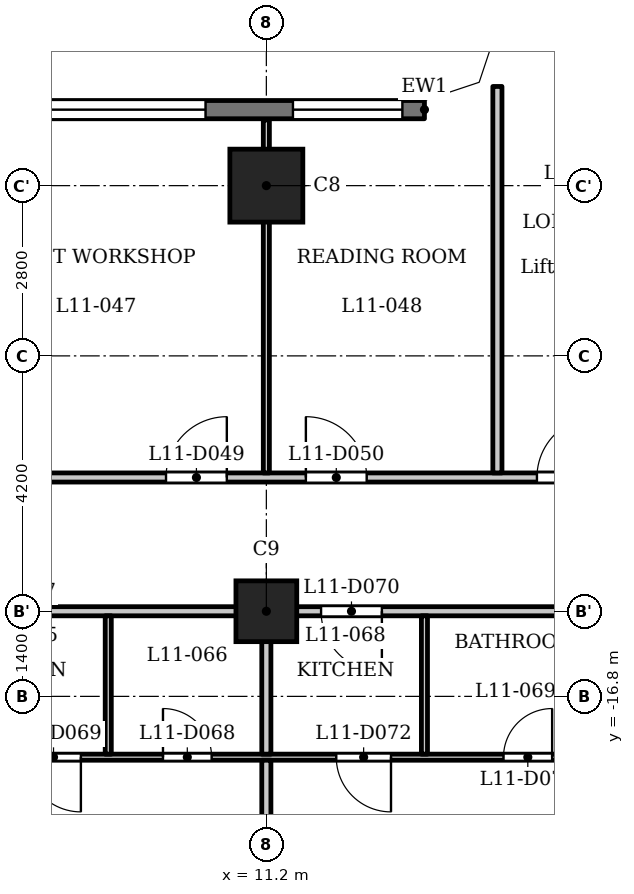
"""IFC4 building model, lengths in metres.
Left out: names, types, materials, properties, quantities, classifications, styles, units other than length and angle.
Written with IfcOpenShell. Run it as: python <this file> out.ifc"""

import sys

from ifc_helpers import new_model, si_unit, direction, frame, frame_2d, origin, origin_2d, place, context, subcontext, project, spatial, polyline, rectangle, outline, extrude, element, fill, save


model = new_model("IFC4")
c1 = context("Model", 3, precision=1e-05, world=origin(), true_north=direction((0.0, 1.0)))
c2 = subcontext(c1, "Body", "Model", "MODEL_VIEW")
j1 = project(units=[si_unit("LENGTHUNIT", "METRE"), si_unit("PLANEANGLEUNIT", "RADIAN")], contexts=[c1])
p1 = place(None, origin())
s1 = spatial("IfcSite", under=j1, at=p1, CompositionType="ELEMENT")
p2 = place(p1, origin())
s2 = spatial("IfcBuilding", under=s1, at=p2, CompositionType="ELEMENT")
p3 = place(p2, frame((0.0, 0.0, 48.0)))
s3 = spatial("IfcBuildingStorey", under=s2, at=p3, CompositionType="ELEMENT", Elevation=48.0)
p4 = place(p3, frame((11.2, -8.4, 0.0), z_axis=(0.0, 0.0, 1.0), x_axis=(1.0, 0.0, 0.0)))
e1 = element("IfcColumn", 1, at=p4, inside=s3, PredefinedType="COLUMN", context=c2, shape_type="SweptSolid", body=[
    extrude(rectangle(XDim=1.2, YDim=1.2, at=origin_2d()), origin(), (0.0, 0.0, 1.0), 3.5),
])
p5 = place(p3, frame((11.2, -15.4, 0.0), z_axis=(0.0, 0.0, 1.0), x_axis=(1.0, 0.0, 0.0)))
e2 = element("IfcColumn", 2, at=p5, inside=s3, PredefinedType="COLUMN", context=c2, shape_type="SweptSolid", body=[
    extrude(rectangle(XDim=1.0, YDim=1.0, at=origin_2d()), origin(), (0.0, 0.0, 1.0), 3.5),
])
p6 = place(p3, frame((13.8, -7.15, 0.0), z_axis=(0.0, 0.0, 1.0), x_axis=(-1.0, 0.0, 0.0)))
e3 = element("IfcWall", 3, at=p6, inside=s3, PredefinedType="SOLIDWALL", context=c2, shape_type="SweptSolid", body=[
    extrude(rectangle(XDim=27.6, YDim=0.3, at=frame_2d((13.8, 0.0))), origin(), (0.0, 0.0, 1.0), 3.2),
])
p7 = place(p6, frame((0.363, 0.0, 0.9)))
e4 = element("IfcOpeningElement", 4, at=p7, cuts=e3, PredefinedType="OPENING", context=c2, shape_type="SweptSolid", body=[
    extrude(rectangle(XDim=1.8, YDim=1.25, at=frame_2d((0.9, 0.625))), frame((0.0, 0.16, 0.0), z_axis=(0.0, -1.0, 0.0), x_axis=(1.0, 0.0, 0.0)), (0.0, 0.0, 1.0), 0.32),
])
p8 = place(p6, frame((3.6, 0.0, 1.2)))
e5 = element("IfcOpeningElement", 5, at=p8, cuts=e3, PredefinedType="OPENING", context=c2, shape_type="SweptSolid", body=[
    extrude(rectangle(XDim=3.6, YDim=0.95, at=frame_2d((1.8, 0.475))), frame((0.0, 0.16, 0.0), z_axis=(0.0, -1.0, 0.0), x_axis=(1.0, 0.0, 0.0)), (0.0, 0.0, 1.0), 0.32),
])
p9 = place(p6, frame((9.2, 0.0, 1.2)))
e6 = element("IfcOpeningElement", 6, at=p9, cuts=e3, PredefinedType="OPENING", context=c2, shape_type="SweptSolid", body=[
    extrude(rectangle(XDim=3.6, YDim=0.95, at=frame_2d((1.8, 0.475))), frame((0.0, 0.16, 0.0), z_axis=(0.0, -1.0, 0.0), x_axis=(1.0, 0.0, 0.0)), (0.0, 0.0, 1.0), 0.32),
])
p10 = place(p6, frame((14.8, 0.0, 1.2)))
e7 = element("IfcOpeningElement", 7, at=p10, cuts=e3, PredefinedType="OPENING", context=c2, shape_type="SweptSolid", body=[
    extrude(rectangle(XDim=3.6, YDim=0.95, at=frame_2d((1.8, 0.475))), frame((0.0, 0.16, 0.0), z_axis=(0.0, -1.0, 0.0), x_axis=(1.0, 0.0, 0.0)), (0.0, 0.0, 1.0), 0.32),
])
p11 = place(p6, frame((20.4, 0.0, 1.2)))
e8 = element("IfcOpeningElement", 8, at=p11, cuts=e3, PredefinedType="OPENING", context=c2, shape_type="SweptSolid", body=[
    extrude(rectangle(XDim=3.6, YDim=0.95, at=frame_2d((1.8, 0.475))), frame((0.0, 0.16, 0.0), z_axis=(0.0, -1.0, 0.0), x_axis=(1.0, 0.0, 0.0)), (0.0, 0.0, 1.0), 0.32),
])
p12 = place(p6, frame((25.438, 0.0, 0.9)))
e9 = element("IfcOpeningElement", 9, at=p12, cuts=e3, PredefinedType="OPENING", context=c2, shape_type="SweptSolid", body=[
    extrude(rectangle(XDim=1.8, YDim=1.25, at=frame_2d((0.9, 0.625))), frame((0.0, 0.16, 0.0), z_axis=(0.0, -1.0, 0.0), x_axis=(1.0, 0.0, 0.0)), (0.0, 0.0, 1.0), 0.32),
])
p13 = place(p3, frame((-26.394, -17.8, 0.0), z_axis=(0.0, 0.0, 1.0), x_axis=(1.0, 0.0, 0.0)))
e10 = element("IfcWall", 10, at=p13, inside=s3, PredefinedType="PARTITIONING", context=c2, shape_type="SweptSolid", body=[
    extrude(rectangle(XDim=53.126, YDim=0.1, at=frame_2d((26.563, 0.0))), origin(), (0.0, 0.0, 1.0), 3.2),
])
p14 = place(p13, frame((0.794, 0.0, 0.0)))
e11 = element("IfcOpeningElement", 11, at=p14, cuts=e10, PredefinedType="OPENING", context=c2, shape_type="SweptSolid", body=[
    extrude(rectangle(XDim=0.8, YDim=2.1, at=frame_2d((0.4, 1.05))), frame((0.0, 0.06, 0.0), z_axis=(0.0, -1.0, 0.0), x_axis=(1.0, 0.0, 0.0)), (0.0, 0.0, 1.0), 0.12),
])
p15 = place(p13, frame((5.644, 0.0, 0.0)))
e12 = element("IfcOpeningElement", 12, at=p15, cuts=e10, PredefinedType="OPENING", context=c2, shape_type="SweptSolid", body=[
    extrude(rectangle(XDim=0.9, YDim=2.1, at=frame_2d((0.45, 1.05))), frame((0.0, 0.06, 0.0), z_axis=(0.0, -1.0, 0.0), x_axis=(1.0, 0.0, 0.0)), (0.0, 0.0, 1.0), 0.12),
])
p16 = place(p13, frame((10.394, 0.0, 0.0)))
e13 = element("IfcOpeningElement", 13, at=p16, cuts=e10, PredefinedType="OPENING", context=c2, shape_type="SweptSolid", body=[
    extrude(rectangle(XDim=0.8, YDim=2.1, at=frame_2d((0.4, 1.05))), frame((0.0, 0.06, 0.0), z_axis=(0.0, -1.0, 0.0), x_axis=(1.0, 0.0, 0.0)), (0.0, 0.0, 1.0), 0.12),
])
p17 = place(p13, frame((13.244, 0.0, 0.0)))
e14 = element("IfcOpeningElement", 14, at=p17, cuts=e10, PredefinedType="OPENING", context=c2, shape_type="SweptSolid", body=[
    extrude(rectangle(XDim=0.9, YDim=2.1, at=frame_2d((0.45, 1.05))), frame((0.0, 0.06, 0.0), z_axis=(0.0, -1.0, 0.0), x_axis=(1.0, 0.0, 0.0)), (0.0, 0.0, 1.0), 0.12),
])
p18 = place(p13, frame((23.944, 0.0, 0.0)))
e15 = element("IfcOpeningElement", 15, at=p18, cuts=e10, PredefinedType="OPENING", context=c2, shape_type="SweptSolid", body=[
    extrude(rectangle(XDim=0.8, YDim=2.1, at=frame_2d((0.4, 1.05))), frame((0.0, 0.06, 0.0), z_axis=(0.0, -1.0, 0.0), x_axis=(1.0, 0.0, 0.0)), (0.0, 0.0, 1.0), 0.12),
])
p19 = place(p13, frame((22.194, 0.0, 0.0)))
e16 = element("IfcOpeningElement", 16, at=p19, cuts=e10, PredefinedType="OPENING", context=c2, shape_type="SweptSolid", body=[
    extrude(rectangle(XDim=0.9, YDim=2.1, at=frame_2d((0.45, 1.05))), frame((0.0, 0.06, 0.0), z_axis=(0.0, -1.0, 0.0), x_axis=(1.0, 0.0, 0.0)), (0.0, 0.0, 1.0), 0.12),
])
p20 = place(p13, frame((16.594, 0.0, 0.0)))
e17 = element("IfcOpeningElement", 17, at=p20, cuts=e10, PredefinedType="OPENING", context=c2, shape_type="SweptSolid", body=[
    extrude(rectangle(XDim=0.9, YDim=2.1, at=frame_2d((0.45, 1.05))), frame((0.0, 0.06, 0.0), z_axis=(0.0, -1.0, 0.0), x_axis=(1.0, 0.0, 0.0)), (0.0, 0.0, 1.0), 0.12),
])
p21 = place(p13, frame((18.844, 0.0, 0.0)))
e18 = element("IfcOpeningElement", 18, at=p21, cuts=e10, PredefinedType="OPENING", context=c2, shape_type="SweptSolid", body=[
    extrude(rectangle(XDim=0.9, YDim=2.1, at=frame_2d((0.45, 1.05))), frame((0.0, 0.06, 0.0), z_axis=(0.0, -1.0, 0.0), x_axis=(1.0, 0.0, 0.0)), (0.0, 0.0, 1.0), 0.12),
])
p22 = place(p13, frame((30.544, 0.0, 0.0)))
e19 = element("IfcOpeningElement", 19, at=p22, cuts=e10, PredefinedType="OPENING", context=c2, shape_type="SweptSolid", body=[
    extrude(rectangle(XDim=0.8, YDim=2.1, at=frame_2d((0.4, 1.05))), frame((0.0, 0.06, 0.0), z_axis=(0.0, -1.0, 0.0), x_axis=(1.0, 0.0, 0.0)), (0.0, 0.0, 1.0), 0.12),
])
p23 = place(p13, frame((27.294, 0.0, 0.0)))
e20 = element("IfcOpeningElement", 20, at=p23, cuts=e10, PredefinedType="OPENING", context=c2, shape_type="SweptSolid", body=[
    extrude(rectangle(XDim=0.9, YDim=2.1, at=frame_2d((0.45, 1.05))), frame((0.0, 0.06, 0.0), z_axis=(0.0, -1.0, 0.0), x_axis=(1.0, 0.0, 0.0)), (0.0, 0.0, 1.0), 0.12),
])
p24 = place(p13, frame((35.894, 0.0, 0.0)))
e21 = element("IfcOpeningElement", 21, at=p24, cuts=e10, PredefinedType="OPENING", context=c2, shape_type="SweptSolid", body=[
    extrude(rectangle(XDim=0.8, YDim=2.1, at=frame_2d((0.4, 1.05))), frame((0.0, 0.06, 0.0), z_axis=(0.0, -1.0, 0.0), x_axis=(1.0, 0.0, 0.0)), (0.0, 0.0, 1.0), 0.12),
])
p25 = place(p13, frame((33.644, 0.0, 0.0)))
e22 = element("IfcOpeningElement", 22, at=p25, cuts=e10, PredefinedType="OPENING", context=c2, shape_type="SweptSolid", body=[
    extrude(rectangle(XDim=0.9, YDim=2.1, at=frame_2d((0.45, 1.05))), frame((0.0, 0.06, 0.0), z_axis=(0.0, -1.0, 0.0), x_axis=(1.0, 0.0, 0.0)), (0.0, 0.0, 1.0), 0.12),
])
p26 = place(p13, frame((41.494, 0.0, 0.0)))
e23 = element("IfcOpeningElement", 23, at=p26, cuts=e10, PredefinedType="OPENING", context=c2, shape_type="SweptSolid", body=[
    extrude(rectangle(XDim=0.8, YDim=2.1, at=frame_2d((0.4, 1.05))), frame((0.0, 0.06, 0.0), z_axis=(0.0, -1.0, 0.0), x_axis=(1.0, 0.0, 0.0)), (0.0, 0.0, 1.0), 0.12),
])
p27 = place(p13, frame((38.744, 0.0, 0.0)))
e24 = element("IfcOpeningElement", 24, at=p27, cuts=e10, PredefinedType="OPENING", context=c2, shape_type="SweptSolid", body=[
    extrude(rectangle(XDim=0.9, YDim=2.1, at=frame_2d((0.45, 1.05))), frame((0.0, 0.06, 0.0), z_axis=(0.0, -1.0, 0.0), x_axis=(1.0, 0.0, 0.0)), (0.0, 0.0, 1.0), 0.12),
])
p28 = place(p13, frame((49.362, 0.0, 0.0)))
e25 = element("IfcOpeningElement", 25, at=p28, cuts=e10, PredefinedType="OPENING", context=c2, shape_type="SweptSolid", body=[
    extrude(rectangle(XDim=0.8, YDim=2.1, at=frame_2d((0.4, 1.05))), frame((0.0, 0.06, 0.0), z_axis=(0.0, -1.0, 0.0), x_axis=(1.0, 0.0, 0.0)), (0.0, 0.0, 1.0), 0.12),
])
p29 = place(p13, frame((45.094, 0.0, 0.0)))
e26 = element("IfcOpeningElement", 26, at=p29, cuts=e10, PredefinedType="OPENING", context=c2, shape_type="SweptSolid", body=[
    extrude(rectangle(XDim=0.9, YDim=2.1, at=frame_2d((0.45, 1.05))), frame((0.0, 0.06, 0.0), z_axis=(0.0, -1.0, 0.0), x_axis=(1.0, 0.0, 0.0)), (0.0, 0.0, 1.0), 0.12),
])
p30 = place(p3, frame((-27.484, -15.4, 0.0), z_axis=(0.0, 0.0, 1.0), x_axis=(1.0, 0.0, 0.0)))
e27 = element("IfcWall", 27, at=p30, inside=s3, PredefinedType="PARTITIONING", context=c2, shape_type="SweptSolid", body=[
    extrude(rectangle(XDim=54.968, YDim=0.15, at=frame_2d((27.484, 0.0))), origin(), (0.0, 0.0, 1.0), 3.2),
])
p31 = place(p30, frame((5.734, 0.0, 0.0)))
e28 = element("IfcOpeningElement", 28, at=p31, cuts=e27, PredefinedType="OPENING", context=c2, shape_type="SweptSolid", body=[
    extrude(rectangle(XDim=1.0, YDim=2.1, at=frame_2d((0.5, 1.05))), frame((0.0, 0.085, 0.0), z_axis=(0.0, -1.0, 0.0), x_axis=(1.0, 0.0, 0.0)), (0.0, 0.0, 1.0), 0.17),
])
p32 = place(p30, frame((13.334, 0.0, 0.0)))
e29 = element("IfcOpeningElement", 29, at=p32, cuts=e27, PredefinedType="OPENING", context=c2, shape_type="SweptSolid", body=[
    extrude(rectangle(XDim=1.0, YDim=2.1, at=frame_2d((0.5, 1.05))), frame((0.0, 0.085, 0.0), z_axis=(0.0, -1.0, 0.0), x_axis=(1.0, 0.0, 0.0)), (0.0, 0.0, 1.0), 0.17),
])
p33 = place(p30, frame((20.184, 0.0, 0.0)))
e30 = element("IfcOpeningElement", 30, at=p33, cuts=e27, PredefinedType="OPENING", context=c2, shape_type="SweptSolid", body=[
    extrude(rectangle(XDim=1.0, YDim=2.1, at=frame_2d((0.5, 1.05))), frame((0.0, 0.085, 0.0), z_axis=(0.0, -1.0, 0.0), x_axis=(1.0, 0.0, 0.0)), (0.0, 0.0, 1.0), 0.17),
])
p34 = place(p30, frame((29.384, 0.0, 0.0)))
e31 = element("IfcOpeningElement", 31, at=p34, cuts=e27, PredefinedType="OPENING", context=c2, shape_type="SweptSolid", body=[
    extrude(rectangle(XDim=1.0, YDim=2.1, at=frame_2d((0.5, 1.05))), frame((0.0, 0.085, 0.0), z_axis=(0.0, -1.0, 0.0), x_axis=(1.0, 0.0, 0.0)), (0.0, 0.0, 1.0), 0.17),
])
p35 = place(p30, frame((33.734, 0.0, 0.0)))
e32 = element("IfcOpeningElement", 32, at=p35, cuts=e27, PredefinedType="OPENING", context=c2, shape_type="SweptSolid", body=[
    extrude(rectangle(XDim=1.0, YDim=2.1, at=frame_2d((0.5, 1.05))), frame((0.0, 0.085, 0.0), z_axis=(0.0, -1.0, 0.0), x_axis=(1.0, 0.0, 0.0)), (0.0, 0.0, 1.0), 0.17),
])
p36 = place(p30, frame((39.584, 0.0, 0.0)))
e33 = element("IfcOpeningElement", 33, at=p36, cuts=e27, PredefinedType="OPENING", context=c2, shape_type="SweptSolid", body=[
    extrude(rectangle(XDim=1.0, YDim=2.1, at=frame_2d((0.5, 1.05))), frame((0.0, 0.085, 0.0), z_axis=(0.0, -1.0, 0.0), x_axis=(1.0, 0.0, 0.0)), (0.0, 0.0, 1.0), 0.17),
])
p37 = place(p30, frame((45.184, 0.0, 0.0)))
e34 = element("IfcOpeningElement", 34, at=p37, cuts=e27, PredefinedType="OPENING", context=c2, shape_type="SweptSolid", body=[
    extrude(rectangle(XDim=1.0, YDim=2.1, at=frame_2d((0.5, 1.05))), frame((0.0, 0.085, 0.0), z_axis=(0.0, -1.0, 0.0), x_axis=(1.0, 0.0, 0.0)), (0.0, 0.0, 1.0), 0.17),
])
p38 = place(p3, frame((-17.4, -13.2, 0.0), z_axis=(0.0, 0.0, 1.0), x_axis=(1.0, 0.0, 0.0)))
e35 = element("IfcWall", 35, at=p38, inside=s3, PredefinedType="PARTITIONING", context=c2, shape_type="SweptSolid", body=[
    extrude(rectangle(XDim=34.8, YDim=0.15, at=frame_2d((17.4, 0.0))), origin(), (0.0, 0.0, 1.0), 3.2),
])
p39 = place(p38, frame((0.65, 0.0, 0.0)))
e36 = element("IfcOpeningElement", 36, at=p39, cuts=e35, PredefinedType="OPENING", context=c2, shape_type="SweptSolid", body=[
    extrude(rectangle(XDim=1.0, YDim=2.1, at=frame_2d((0.5, 1.05))), frame((0.0, 0.085, 0.0), z_axis=(0.0, -1.0, 0.0), x_axis=(1.0, 0.0, 0.0)), (0.0, 0.0, 1.0), 0.17),
])
p40 = place(p38, frame((33.05, 0.0, 0.0)))
e37 = element("IfcOpeningElement", 37, at=p40, cuts=e35, PredefinedType="OPENING", context=c2, shape_type="SweptSolid", body=[
    extrude(rectangle(XDim=1.0, YDim=2.1, at=frame_2d((0.5, 1.05))), frame((0.0, 0.085, 0.0), z_axis=(0.0, -1.0, 0.0), x_axis=(1.0, 0.0, 0.0)), (0.0, 0.0, 1.0), 0.17),
])
p41 = place(p38, frame((4.55, 0.0, 0.0)))
e38 = element("IfcOpeningElement", 38, at=p41, cuts=e35, PredefinedType="OPENING", context=c2, shape_type="SweptSolid", body=[
    extrude(rectangle(XDim=1.0, YDim=2.1, at=frame_2d((0.5, 1.05))), frame((0.0, 0.085, 0.0), z_axis=(0.0, -1.0, 0.0), x_axis=(1.0, 0.0, 0.0)), (0.0, 0.0, 1.0), 0.17),
])
p42 = place(p38, frame((6.9, 0.0, 0.0)))
e39 = element("IfcOpeningElement", 39, at=p42, cuts=e35, PredefinedType="OPENING", context=c2, shape_type="SweptSolid", body=[
    extrude(rectangle(XDim=1.0, YDim=2.1, at=frame_2d((0.5, 1.05))), frame((0.0, 0.085, 0.0), z_axis=(0.0, -1.0, 0.0), x_axis=(1.0, 0.0, 0.0)), (0.0, 0.0, 1.0), 0.17),
])
p43 = place(p38, frame((15.75, 0.0, 0.0)))
e40 = element("IfcOpeningElement", 40, at=p43, cuts=e35, PredefinedType="OPENING", context=c2, shape_type="SweptSolid", body=[
    extrude(rectangle(XDim=1.0, YDim=2.1, at=frame_2d((0.5, 1.05))), frame((0.0, 0.085, 0.0), z_axis=(0.0, -1.0, 0.0), x_axis=(1.0, 0.0, 0.0)), (0.0, 0.0, 1.0), 0.17),
])
p44 = place(p38, frame((18.1, 0.0, 0.0)))
e41 = element("IfcOpeningElement", 41, at=p44, cuts=e35, PredefinedType="OPENING", context=c2, shape_type="SweptSolid", body=[
    extrude(rectangle(XDim=1.0, YDim=2.1, at=frame_2d((0.5, 1.05))), frame((0.0, 0.085, 0.0), z_axis=(0.0, -1.0, 0.0), x_axis=(1.0, 0.0, 0.0)), (0.0, 0.0, 1.0), 0.17),
])
p45 = place(p38, frame((26.95, 0.0, 0.0)))
e42 = element("IfcOpeningElement", 42, at=p45, cuts=e35, PredefinedType="OPENING", context=c2, shape_type="SweptSolid", body=[
    extrude(rectangle(XDim=1.0, YDim=2.1, at=frame_2d((0.5, 1.05))), frame((0.0, 0.085, 0.0), z_axis=(0.0, -1.0, 0.0), x_axis=(1.0, 0.0, 0.0)), (0.0, 0.0, 1.0), 0.17),
])
p46 = place(p38, frame((29.25, 0.0, 0.0)))
e43 = element("IfcOpeningElement", 43, at=p46, cuts=e35, PredefinedType="OPENING", context=c2, shape_type="SweptSolid", body=[
    extrude(rectangle(XDim=1.0, YDim=2.1, at=frame_2d((0.5, 1.05))), frame((0.0, 0.085, 0.0), z_axis=(0.0, -1.0, 0.0), x_axis=(1.0, 0.0, 0.0)), (0.0, 0.0, 1.0), 0.17),
])
p47 = place(p3, frame((8.6, -17.75, 0.0), z_axis=(0.0, 0.0, 1.0), x_axis=(0.0, 1.0, 0.0)))
e44 = element("IfcWall", 44, at=p47, inside=s3, PredefinedType="PARTITIONING", context=c2, shape_type="SweptSolid", body=[
    extrude(rectangle(XDim=2.275, YDim=0.1, at=frame_2d((1.137, 0.0))), origin(), (0.0, 0.0, 1.0), 3.2),
])
p48 = place(p3, frame((11.2, -13.125, 0.0), z_axis=(0.0, 0.0, 1.0), x_axis=(0.0, 1.0, 0.0)))
e45 = element("IfcWall", 45, at=p48, inside=s3, PredefinedType="PARTITIONING", context=c2, shape_type="SweptSolid", body=[
    extrude(rectangle(XDim=5.805, YDim=0.1, at=frame_2d((2.902, 0.0))), origin(), (0.0, 0.0, 1.0), 3.2),
])
p49 = place(p3, frame((11.2, -23.13, 0.0), z_axis=(0.0, 0.0, 1.0), x_axis=(0.0, 1.0, 0.0)))
e46 = element("IfcWall", 46, at=p49, inside=s3, PredefinedType="PARTITIONING", context=c2, shape_type="SweptSolid", body=[
    extrude(rectangle(XDim=5.28, YDim=0.15, at=frame_2d((2.64, 0.0))), origin(), (0.0, 0.0, 1.0), 3.2),
])
p50 = place(p3, frame((11.2, -17.75, 0.0), z_axis=(0.0, 0.0, 1.0), x_axis=(0.0, 1.0, 0.0)))
e47 = element("IfcWall", 47, at=p50, inside=s3, PredefinedType="PARTITIONING", context=c2, shape_type="SweptSolid", body=[
    extrude(rectangle(XDim=2.275, YDim=0.15, at=frame_2d((1.137, 0.0))), origin(), (0.0, 0.0, 1.0), 3.2),
])
p51 = place(p3, frame((13.8, -17.75, 0.0), z_axis=(0.0, 0.0, 1.0), x_axis=(0.0, 1.0, 0.0)))
e48 = element("IfcWall", 48, at=p51, inside=s3, PredefinedType="PARTITIONING", context=c2, shape_type="SweptSolid", body=[
    extrude(rectangle(XDim=2.275, YDim=0.1, at=frame_2d((1.137, 0.0))), origin(), (0.0, 0.0, 1.0), 3.2),
])
p52 = place(p3, frame((15.0, -13.125, 0.0), z_axis=(0.0, 0.0, 1.0), x_axis=(0.0, 1.0, 0.0)))
e49 = element("IfcWall", 49, at=p52, inside=s3, PredefinedType="PARTITIONING", context=c2, shape_type="SweptSolid", body=[
    extrude(rectangle(XDim=6.356, YDim=0.15, at=frame_2d((3.178, 0.0))), origin(), (0.0, 0.0, 1.0), 3.2),
])
p53 = place(p3, origin())
e50 = element("IfcWall", 50, at=p53, inside=s3, PredefinedType="SOLIDWALL", context=c2, shape_type="SweptSolid", body=[
    extrude(outline(polyline([(14.937, -6.937), (15.3, -5.849), (15.3, -5.8), (15.0, -5.8), (14.7, -6.7), (13.8, -7.0), (13.8, -7.3), (13.849, -7.3), (14.937, -6.937)])), origin(), (0.0, 0.0, 1.0), 3.2),
])
p54 = place(p40, origin())
e51 = element("IfcDoor", 51, at=p54, inside=s3, OperationType="SINGLE_SWING_LEFT", PredefinedType="DOOR", context=c2, shape_type="SweptSolid", body=[
    extrude(rectangle(XDim=1.0, YDim=2.1, at=frame_2d((0.5, 1.05))), frame((0.0, 0.025, 0.0), z_axis=(0.0, -1.0, 0.0), x_axis=(1.0, 0.0, 0.0)), (0.0, 0.0, 1.0), 0.05),
])
fill(e37, e51)
p55 = place(p45, origin())
e52 = element("IfcDoor", 52, at=p55, inside=s3, OperationType="SINGLE_SWING_LEFT", PredefinedType="DOOR", context=c2, shape_type="SweptSolid", body=[
    extrude(rectangle(XDim=1.0, YDim=2.1, at=frame_2d((0.5, 1.05))), frame((0.0, 0.025, 0.0), z_axis=(0.0, -1.0, 0.0), x_axis=(1.0, 0.0, 0.0)), (0.0, 0.0, 1.0), 0.05),
])
fill(e42, e52)
p56 = place(p46, origin())
e53 = element("IfcDoor", 53, at=p56, inside=s3, OperationType="SINGLE_SWING_RIGHT", PredefinedType="DOOR", context=c2, shape_type="SweptSolid", body=[
    extrude(rectangle(XDim=1.0, YDim=2.1, at=frame_2d((0.5, 1.05))), frame((0.0, 0.025, 0.0), z_axis=(0.0, -1.0, 0.0), x_axis=(1.0, 0.0, 0.0)), (0.0, 0.0, 1.0), 0.05),
])
fill(e43, e53)
p57 = place(p24, origin())
e54 = element("IfcDoor", 54, at=p57, inside=s3, OperationType="SINGLE_SWING_RIGHT", PredefinedType="DOOR", context=c2, shape_type="SweptSolid", body=[
    extrude(rectangle(XDim=0.8, YDim=2.1, at=frame_2d((0.4, 1.05))), frame((0.0, 0.025, 0.0), z_axis=(0.0, -1.0, 0.0), x_axis=(1.0, 0.0, 0.0)), (0.0, 0.0, 1.0), 0.05),
])
fill(e21, e54)
p58 = place(p25, origin())
e55 = element("IfcDoor", 55, at=p58, inside=s3, OperationType="SINGLE_SWING_RIGHT", PredefinedType="DOOR", context=c2, shape_type="SweptSolid", body=[
    extrude(rectangle(XDim=0.9, YDim=2.1, at=frame_2d((0.45, 1.05))), frame((0.0, 0.025, 0.0), z_axis=(0.0, -1.0, 0.0), x_axis=(1.0, 0.0, 0.0)), (0.0, 0.0, 1.0), 0.05),
])
fill(e22, e55)
p59 = place(p36, origin())
e56 = element("IfcDoor", 56, at=p59, inside=s3, OperationType="SINGLE_SWING_RIGHT", PredefinedType="DOOR", context=c2, shape_type="SweptSolid", body=[
    extrude(rectangle(XDim=1.0, YDim=2.1, at=frame_2d((0.5, 1.05))), frame((0.0, 0.025, 0.0), z_axis=(0.0, -1.0, 0.0), x_axis=(1.0, 0.0, 0.0)), (0.0, 0.0, 1.0), 0.05),
])
fill(e33, e56)
p60 = place(p26, origin())
e57 = element("IfcDoor", 57, at=p60, inside=s3, OperationType="SINGLE_SWING_LEFT", PredefinedType="DOOR", context=c2, shape_type="SweptSolid", body=[
    extrude(rectangle(XDim=0.8, YDim=2.1, at=frame_2d((0.4, 1.05))), frame((0.0, 0.025, 0.0), z_axis=(0.0, -1.0, 0.0), x_axis=(1.0, 0.0, 0.0)), (0.0, 0.0, 1.0), 0.05),
])
fill(e23, e57)
p61 = place(p27, origin())
e58 = element("IfcDoor", 58, at=p61, inside=s3, OperationType="SINGLE_SWING_RIGHT", PredefinedType="DOOR", context=c2, shape_type="SweptSolid", body=[
    extrude(rectangle(XDim=0.9, YDim=2.1, at=frame_2d((0.45, 1.05))), frame((0.0, 0.025, 0.0), z_axis=(0.0, -1.0, 0.0), x_axis=(1.0, 0.0, 0.0)), (0.0, 0.0, 1.0), 0.05),
])
fill(e24, e58)
p62 = place(p7, origin())
e59 = element("IfcWindow", 59, at=p62, inside=s3, PartitioningType="SINGLE_PANEL", PredefinedType="WINDOW", context=c2, shape_type="SweptSolid", body=[
    extrude(rectangle(XDim=1.8, YDim=1.25, at=frame_2d((0.9, 0.625))), frame((0.0, 0.03, 0.0), z_axis=(0.0, -1.0, 0.0), x_axis=(1.0, 0.0, 0.0)), (0.0, 0.0, 1.0), 0.06),
])
fill(e4, e59)
p63 = place(p8, origin())
e60 = element("IfcWindow", 60, at=p63, inside=s3, PartitioningType="SINGLE_PANEL", PredefinedType="WINDOW", context=c2, shape_type="SweptSolid", body=[
    extrude(rectangle(XDim=3.6, YDim=0.95, at=frame_2d((1.8, 0.475))), frame((0.0, 0.03, 0.0), z_axis=(0.0, -1.0, 0.0), x_axis=(1.0, 0.0, 0.0)), (0.0, 0.0, 1.0), 0.06),
])
fill(e5, e60)
save(model, sys.argv[1])
